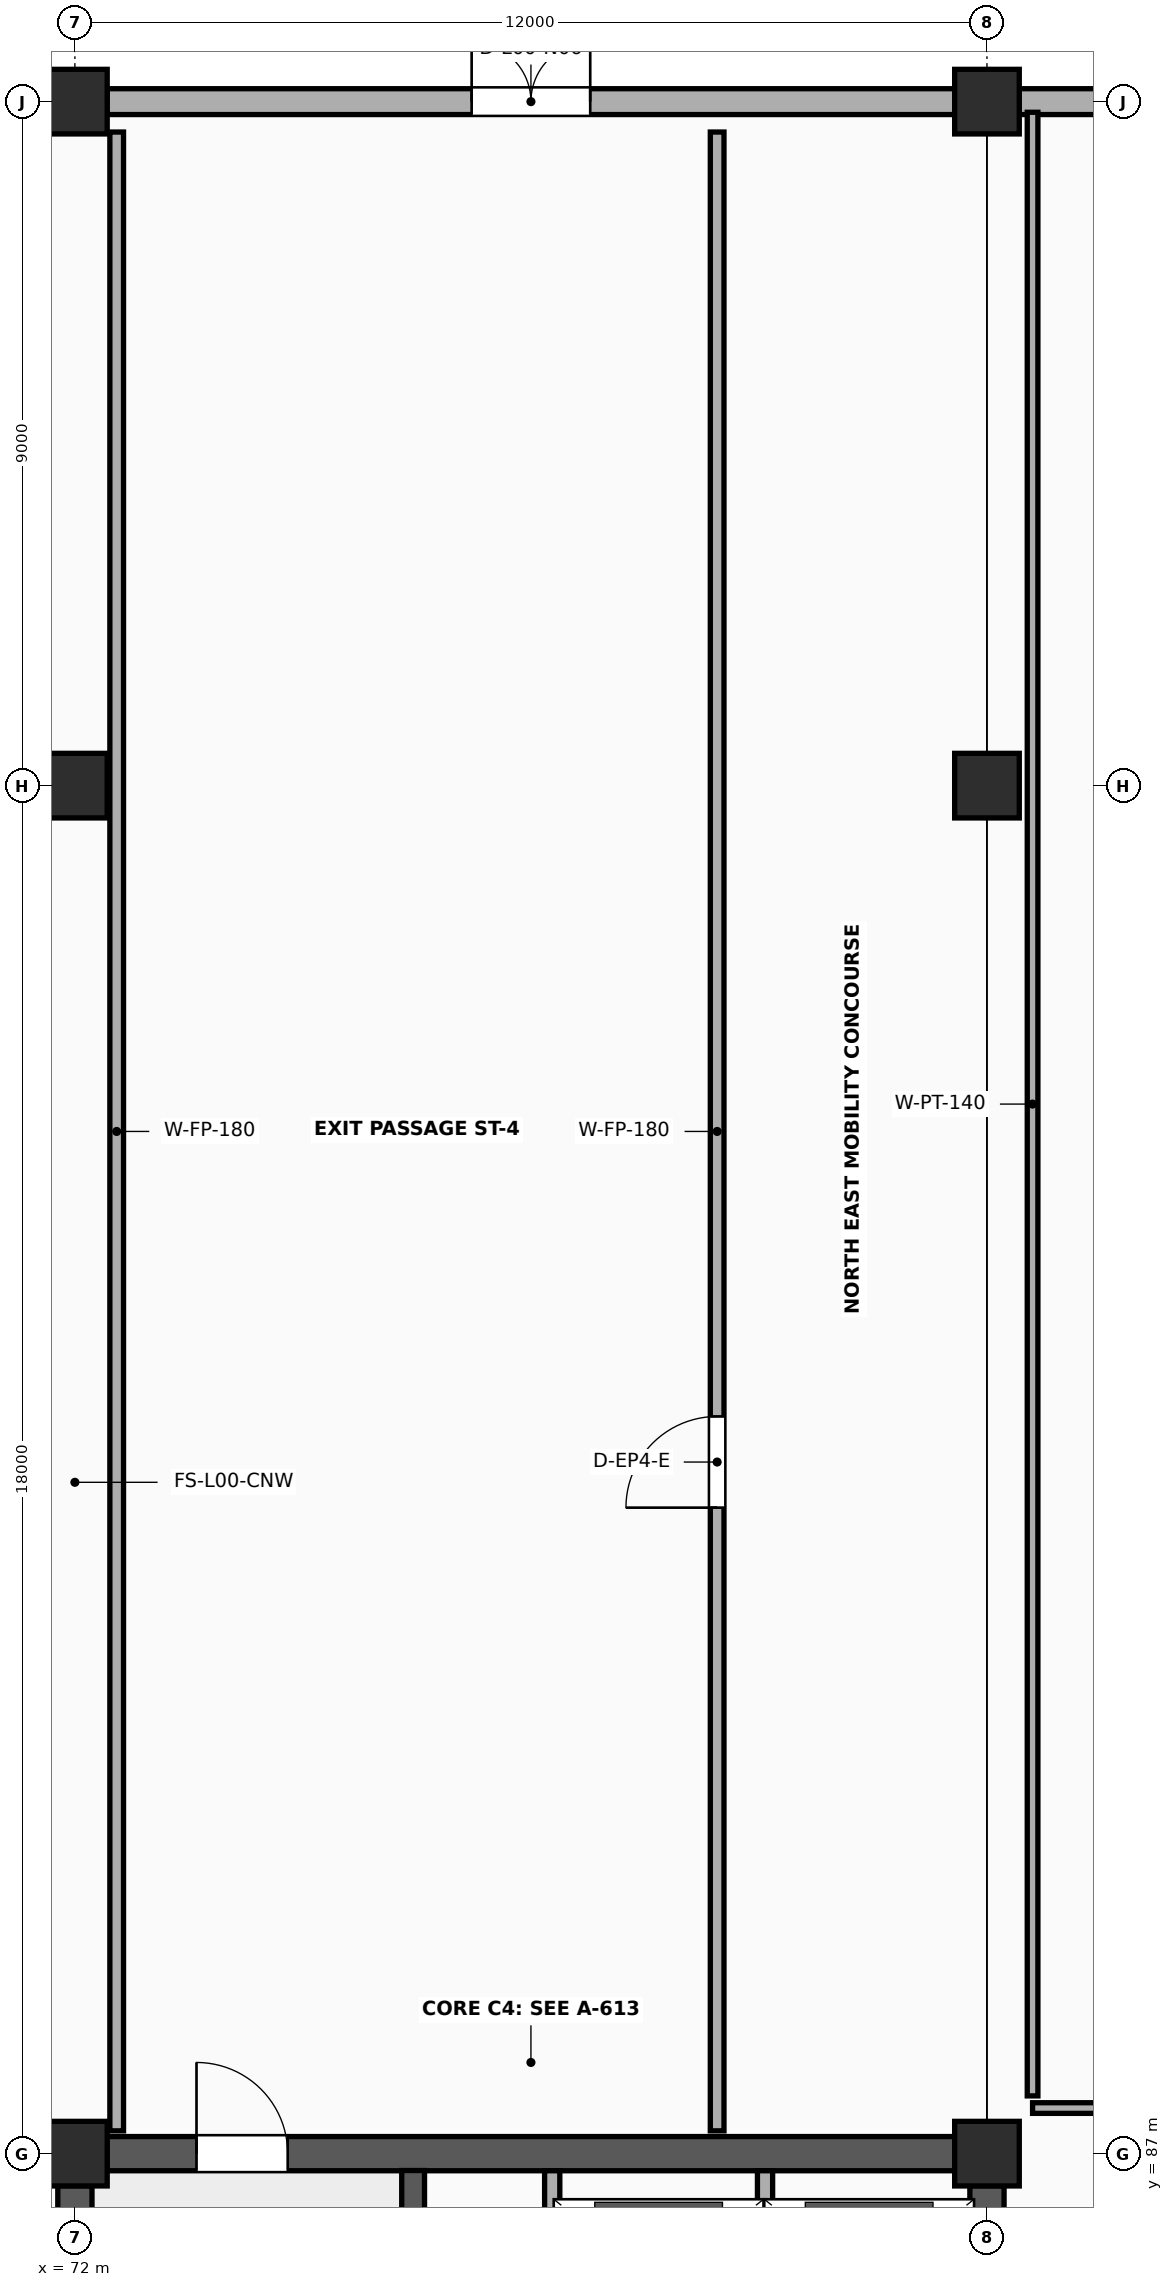
"""IFC4 building model, lengths in metres.
Left out: names, types, materials, properties, quantities, classifications, styles, units other than length and angle.
Written with IfcOpenShell. Run it as: python <this file> out.ifc"""

import sys

from ifc_helpers import new_model, si_unit, direction, frame, frame_2d, origin, origin_2d, place, context, subcontext, project, spatial, rectangle, extrude, element, fill, save


model = new_model("IFC4")
c1 = context("Model", 3, precision=1e-05, world=origin(), true_north=direction((0.0, 1.0)))
c2 = subcontext(c1, "Body", "Model", "MODEL_VIEW")
j1 = project(units=[si_unit("LENGTHUNIT", "METRE"), si_unit("PLANEANGLEUNIT", "RADIAN")], contexts=[c1])
p1 = place(None, origin())
s1 = spatial("IfcSite", under=j1, at=p1, CompositionType="ELEMENT")
p2 = place(p1, origin())
s2 = spatial("IfcBuilding", under=s1, at=p2, CompositionType="ELEMENT")
p3 = place(p2, origin())
s3 = spatial("IfcBuildingStorey", under=s2, at=p3, CompositionType="ELEMENT", Elevation=0.0)
for number, where, z_axis, x_axis in (
    (1, (72.0, 87.0, 0.0), (0.0, 0.0, 1.0), (1.0, 0.0, 0.0)),
    (2, (72.0, 105.0, 0.0), (0.0, 0.0, 1.0), (1.0, 0.0, 0.0)),
    (3, (72.0, 114.0, 0.0), (0.0, 0.0, 1.0), (1.0, 0.0, 0.0)),
    (4, (84.0, 87.0, 0.0), (0.0, 0.0, 1.0), (1.0, 0.0, 0.0)),
    (5, (84.0, 105.0, 0.0), (0.0, 0.0, 1.0), (1.0, 0.0, 0.0)),
    (6, (84.0, 114.0, 0.0), (0.0, 0.0, 1.0), (1.0, 0.0, 0.0)),
):
    element("IfcColumn", number, at=place(p3, frame(where, z_axis=z_axis, x_axis=x_axis)), inside=s3, PredefinedType="COLUMN", context=c2, shape_type="SweptSolid", body=[
        extrude(rectangle(XDim=0.85, YDim=0.85, at=origin_2d()), origin(), (0.0, 0.0, 1.0), 5.4),
    ])
p4 = place(p3, frame((72.422, 87.0, 0.0), z_axis=(0.0, 0.0, 1.0), x_axis=(1.0, 0.0, 0.0)))
e7 = element("IfcWall", 7, at=p4, inside=s3, PredefinedType="SHEAR", context=c2, shape_type="SweptSolid", body=[
    extrude(rectangle(XDim=11.156, YDim=0.45, at=frame_2d((5.578, 0.0))), origin(), (0.0, 0.0, 1.0), 5.203),
])
p5 = place(p4, frame((1.178, 0.0, 0.0)))
e8 = element("IfcOpeningElement", 8, at=p5, cuts=e7, PredefinedType="OPENING", context=c2, shape_type="SweptSolid", body=[
    extrude(rectangle(XDim=1.2, YDim=2.2, at=frame_2d((0.6, 1.1))), frame((0.0, 0.24, 0.0), z_axis=(0.0, -1.0, 0.0), x_axis=(1.0, 0.0, 0.0)), (0.0, 0.0, 1.0), 0.48),
])
for number, where, z_axis, x_axis in (
    (9, (72.0, 75.222, 0.0), (0.0, 0.0, 1.0), (0.0, 1.0, 0.0)),
    (10, (84.0, 75.222, 0.0), (0.0, 0.0, 1.0), (0.0, 1.0, 0.0)),
):
    element("IfcWall", number, at=place(p3, frame(where, z_axis=z_axis, x_axis=x_axis)), inside=s3, PredefinedType="SHEAR", context=c2, shape_type="SweptSolid", body=[
        extrude(rectangle(XDim=11.356, YDim=0.45, at=frame_2d((5.678, 0.0))), origin(), (0.0, 0.0, 1.0), 5.203),
    ])
p6 = place(p3, frame((76.45, 75.222, 0.0), z_axis=(0.0, 0.0, 1.0), x_axis=(0.0, 1.0, 0.0)))
e11 = element("IfcWall", 11, at=p6, inside=s3, PredefinedType="SHEAR", context=c2, shape_type="SweptSolid", body=[
    extrude(rectangle(XDim=11.556, YDim=0.3, at=frame_2d((5.778, 0.0))), origin(), (0.0, 0.0, 1.0), 5.203),
])
p7 = place(p6, frame((0.9, 0.0, 0.0)))
e12 = element("IfcOpeningElement", 12, at=p7, cuts=e11, PredefinedType="OPENING", context=c2, shape_type="SweptSolid", body=[
    extrude(rectangle(XDim=1.1, YDim=2.2, at=frame_2d((0.55, 1.1))), frame((0.0, 0.165, 0.0), z_axis=(0.0, -1.0, 0.0), x_axis=(1.0, 0.0, 0.0)), (0.0, 0.0, 1.0), 0.33),
])
for number, where, z_axis, x_axis in (
    (13, (78.28, 83.92, 0.0), (0.0, 0.0, 1.0), (0.0, 1.0, 0.0)),
    (14, (81.08, 83.92, 0.0), (0.0, 0.0, 1.0), (0.0, 1.0, 0.0)),
):
    element("IfcWall", number, at=place(p3, frame(where, z_axis=z_axis, x_axis=x_axis)), inside=s3, PredefinedType="SOLIDWALL", context=c2, shape_type="SweptSolid", body=[
        extrude(rectangle(XDim=2.855, YDim=0.2, at=frame_2d((1.427, 0.0))), origin(), (0.0, 0.0, 1.0), 5.193),
    ])
p8 = place(p3, frame((72.423, 114.0, 0.0), z_axis=(0.0, 0.0, 1.0), x_axis=(1.0, 0.0, 0.0)))
e15 = element("IfcWall", 15, at=p8, inside=s3, PredefinedType="SOLIDWALL", context=c2, shape_type="SweptSolid", body=[
    extrude(rectangle(XDim=11.154, YDim=0.34, at=frame_2d((5.577, 0.0))), origin(), (0.0, 0.0, 1.0), 3.85),
])
p9 = place(p8, frame((4.797, 0.0, 0.0)))
e16 = element("IfcOpeningElement", 16, at=p9, cuts=e15, PredefinedType="OPENING", context=c2, shape_type="SweptSolid", body=[
    extrude(rectangle(XDim=1.56, YDim=2.3, at=frame_2d((0.78, 1.15))), frame((0.0, 0.185, 0.0), z_axis=(0.0, -1.0, 0.0), x_axis=(1.0, 0.0, 0.0)), (0.0, 0.0, 1.0), 0.37),
])
p10 = place(p3, frame((84.423, 114.0, 0.0), z_axis=(0.0, 0.0, 1.0), x_axis=(1.0, 0.0, 0.0)))
e17 = element("IfcWall", 17, at=p10, inside=s3, PredefinedType="SOLIDWALL", context=c2, shape_type="SweptSolid", body=[
    extrude(rectangle(XDim=11.154, YDim=0.34, at=frame_2d((5.577, 0.0))), origin(), (0.0, 0.0, 1.0), 3.85),
])
p11 = place(p10, frame((4.737, 0.0, 0.0)))
e18 = element("IfcOpeningElement", 18, at=p11, cuts=e17, PredefinedType="OPENING", context=c2, shape_type="SweptSolid", body=[
    extrude(rectangle(XDim=1.68, YDim=2.34, at=frame_2d((0.84, 1.17))), frame((0.0, 0.185, 0.0), z_axis=(0.0, -1.0, 0.0), x_axis=(1.0, 0.0, 0.0)), (0.0, 0.0, 1.0), 0.37),
])
p12 = place(p3, frame((72.55, 87.3, 0.0), z_axis=(0.0, 0.0, 1.0), x_axis=(0.0, 1.0, 0.0)))
e19 = element("IfcWall", 19, at=p12, inside=s3, PredefinedType="SOLIDWALL", context=c2, shape_type="SweptSolid", body=[
    extrude(rectangle(XDim=26.3, YDim=0.18, at=frame_2d((13.15, 0.0))), origin(), (0.0, 0.0, 1.0), 2.6),
])
p13 = place(p3, frame((80.45, 87.3, 0.0), z_axis=(0.0, 0.0, 1.0), x_axis=(0.0, 1.0, 0.0)))
e20 = element("IfcWall", 20, at=p13, inside=s3, PredefinedType="SOLIDWALL", context=c2, shape_type="SweptSolid", body=[
    extrude(rectangle(XDim=26.3, YDim=0.18, at=frame_2d((13.15, 0.0))), origin(), (0.0, 0.0, 1.0), 2.6),
])
p14 = place(p13, frame((8.2, 0.0, 0.0)))
e21 = element("IfcOpeningElement", 21, at=p14, cuts=e20, PredefinedType="OPENING", context=c2, shape_type="SweptSolid", body=[
    extrude(rectangle(XDim=1.2, YDim=2.2, at=frame_2d((0.6, 1.1))), frame((0.0, 0.105, 0.0), z_axis=(0.0, -1.0, 0.0), x_axis=(1.0, 0.0, 0.0)), (0.0, 0.0, 1.0), 0.21),
])
p15 = place(p3, frame((84.6, 87.6, 0.0), z_axis=(0.0, 0.0, 1.0), x_axis=(1.0, 0.0, 0.0)))
e22 = element("IfcWall", 22, at=p15, inside=s3, PredefinedType="PARTITIONING", context=c2, shape_type="SweptSolid", body=[
    extrude(rectangle(XDim=34.8, YDim=0.14, at=frame_2d((17.4, 0.0))), origin(), (0.0, 0.0, 1.0), 2.75),
])
p16 = place(p15, frame((16.71, 0.0, 0.0)))
e23 = element("IfcOpeningElement", 23, at=p16, cuts=e22, PredefinedType="OPENING", context=c2, shape_type="SweptSolid", body=[
    extrude(rectangle(XDim=1.38, YDim=2.23, at=frame_2d((0.69, 1.115))), frame((0.0, 0.085, 0.0), z_axis=(0.0, -1.0, 0.0), x_axis=(1.0, 0.0, 0.0)), (0.0, 0.0, 1.0), 0.17),
])
p17 = place(p3, frame((84.6, 87.76, 0.0), z_axis=(0.0, 0.0, 1.0), x_axis=(0.0, 1.0, 0.0)))
e24 = element("IfcWall", 24, at=p17, inside=s3, PredefinedType="PARTITIONING", context=c2, shape_type="SweptSolid", body=[
    extrude(rectangle(XDim=26.1, YDim=0.14, at=frame_2d((13.05, 0.0))), origin(), (0.0, 0.0, 1.0), 2.75),
])
p18 = place(p9, origin())
e25 = element("IfcDoor", 25, at=p18, inside=s3, OperationType="DOUBLE_DOOR_SINGLE_SWING", PredefinedType="DOOR", context=c2, shape_type="SweptSolid", body=[
    extrude(rectangle(XDim=1.56, YDim=2.3, at=frame_2d((0.78, 1.15))), frame((0.0, 0.025, 0.0), z_axis=(0.0, -1.0, 0.0), x_axis=(1.0, 0.0, 0.0)), (0.0, 0.0, 1.0), 0.05),
])
fill(e16, e25)
p19 = place(p5, origin())
e26 = element("IfcDoor", 26, at=p19, inside=s3, OperationType="SINGLE_SWING_LEFT", PredefinedType="DOOR", context=c2, shape_type="SweptSolid", body=[
    extrude(rectangle(XDim=1.2, YDim=2.2, at=frame_2d((0.6, 1.1))), frame((0.0, 0.025, 0.0), z_axis=(0.0, -1.0, 0.0), x_axis=(1.0, 0.0, 0.0)), (0.0, 0.0, 1.0), 0.05),
])
fill(e8, e26)
p20 = place(p14, frame((1.2, 0.0, 0.0), z_axis=(0.0, 0.0, 1.0), x_axis=(-1.0, 0.0, 0.0)))
e27 = element("IfcDoor", 27, at=p20, inside=s3, OperationType="SINGLE_SWING_LEFT", PredefinedType="DOOR", context=c2, shape_type="SweptSolid", body=[
    extrude(rectangle(XDim=1.2, YDim=2.2, at=frame_2d((0.6, 1.1))), frame((0.0, 0.025, 0.0), z_axis=(0.0, -1.0, 0.0), x_axis=(1.0, 0.0, 0.0)), (0.0, 0.0, 1.0), 0.05),
])
fill(e21, e27)
save(model, sys.argv[1])
